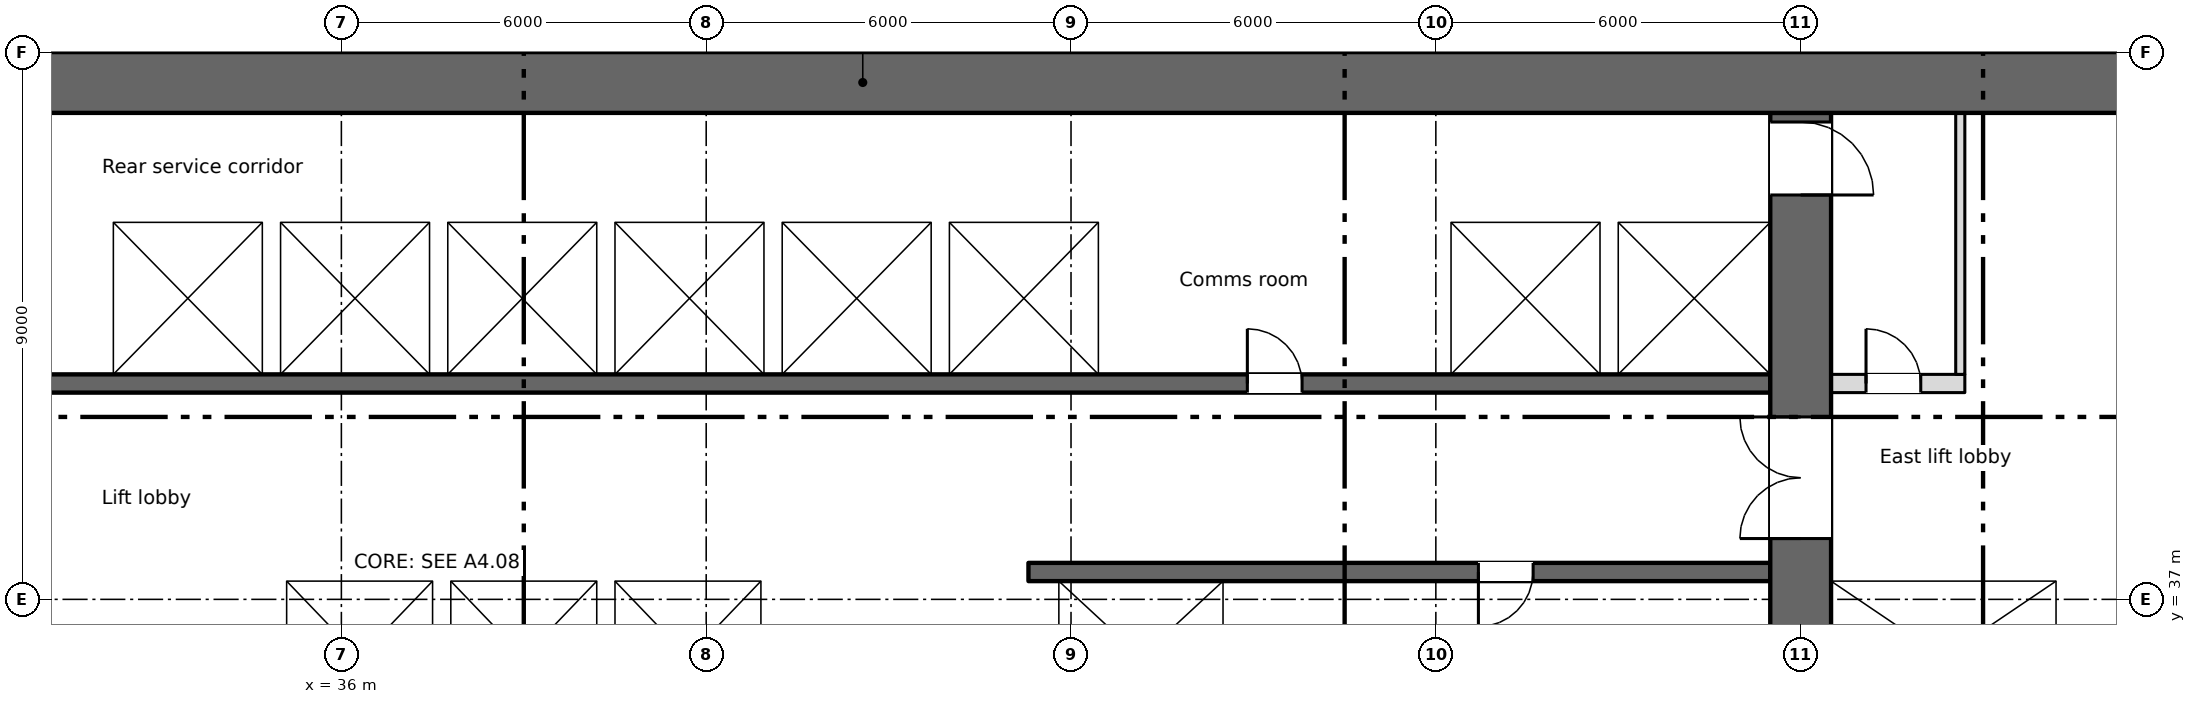
"""IFC4 building model, lengths in metres.
Left out: names, types, materials, properties, quantities, classifications, styles, units other than length and angle.
Written with IfcOpenShell. Run it as: python <this file> out.ifc"""

import sys

from ifc_helpers import new_model, si_unit, direction, frame, frame_2d, origin, place, context, subcontext, project, spatial, rectangle, extrude, element, fill, save


model = new_model("IFC4")
c1 = context("Model", 3, precision=1e-05, world=origin(), true_north=direction((0.0, 1.0)))
c2 = subcontext(c1, "Body", "Model", "MODEL_VIEW")
j1 = project(units=[si_unit("LENGTHUNIT", "METRE"), si_unit("PLANEANGLEUNIT", "RADIAN")], contexts=[c1])
p1 = place(None, origin())
s1 = spatial("IfcSite", under=j1, at=p1, CompositionType="ELEMENT")
p2 = place(p1, origin())
s2 = spatial("IfcBuilding", under=s1, at=p2, CompositionType="ELEMENT")
p3 = place(p2, frame((0.0, 0.0, 30.0)))
s3 = spatial("IfcBuildingStorey", under=s2, at=p3, CompositionType="ELEMENT", Elevation=30.0)
p4 = place(p3, frame((5.55, 45.5, 0.0), z_axis=(0.0, 0.0, 1.0), x_axis=(1.0, 0.0, 0.0)))
e1 = element("IfcWall", 1, at=p4, inside=s3, PredefinedType="SHEAR", context=c2, shape_type="SweptSolid", body=[
    extrude(rectangle(XDim=66.9, YDim=1.0, at=frame_2d((33.45, 0.0))), origin(), (0.0, 0.0, 1.0), 3.35),
])
p5 = place(p4, frame((7.2, 0.0, 0.6)))
e2 = element("IfcOpeningElement", 2, at=p5, cuts=e1, PredefinedType="OPENING", context=c2, shape_type="SweptSolid", body=[
    extrude(rectangle(XDim=0.6, YDim=2.4, at=frame_2d((0.3, 1.2))), frame((0.0, 0.51, 0.0), z_axis=(0.0, -1.0, 0.0), x_axis=(1.0, 0.0, 0.0)), (0.0, 0.0, 1.0), 1.02),
])
p6 = place(p4, frame((61.2, 0.0, 0.6)))
e3 = element("IfcOpeningElement", 3, at=p6, cuts=e1, PredefinedType="OPENING", context=c2, shape_type="SweptSolid", body=[
    extrude(rectangle(XDim=0.6, YDim=2.4, at=frame_2d((0.3, 1.2))), frame((0.0, 0.51, 0.0), z_axis=(0.0, -1.0, 0.0), x_axis=(1.0, 0.0, 0.0)), (0.0, 0.0, 1.0), 1.02),
])
p7 = place(p3, frame((64.35, 34.8, 0.0), z_axis=(0.0, 0.0, 1.0), x_axis=(0.0, 1.0, 0.0)))
e4 = element("IfcWall", 4, at=p7, inside=s3, PredefinedType="SHEAR", context=c2, shape_type="SweptSolid", body=[
    extrude(rectangle(XDim=10.2, YDim=0.3, at=frame_2d((5.1, 0.0))), origin(), (0.0, 0.0, 1.0), 3.35),
])
p8 = place(p3, frame((60.0, 28.4, 0.0), z_axis=(0.0, 0.0, 1.0), x_axis=(0.0, 1.0, 0.0)))
e5 = element("IfcWall", 5, at=p8, inside=s3, PredefinedType="SHEAR", context=c2, shape_type="SweptSolid", body=[
    extrude(rectangle(XDim=16.6, YDim=1.0, at=frame_2d((8.3, 0.0))), origin(), (0.0, 0.0, 1.0), 3.35),
])
p9 = place(p8, frame((9.6, 0.0, 0.0)))
e6 = element("IfcOpeningElement", 6, at=p9, cuts=e5, PredefinedType="OPENING", context=c2, shape_type="SweptSolid", body=[
    extrude(rectangle(XDim=2.0, YDim=2.1, at=frame_2d((1.0, 1.05))), frame((0.0, 0.51, 0.0), z_axis=(0.0, -1.0, 0.0), x_axis=(1.0, 0.0, 0.0)), (0.0, 0.0, 1.0), 1.02),
])
p10 = place(p8, frame((15.25, 0.0, 0.0)))
e7 = element("IfcOpeningElement", 7, at=p10, cuts=e5, PredefinedType="OPENING", context=c2, shape_type="SweptSolid", body=[
    extrude(rectangle(XDim=1.2, YDim=2.1, at=frame_2d((0.6, 1.05))), frame((0.0, 0.51, 0.0), z_axis=(0.0, -1.0, 0.0), x_axis=(1.0, 0.0, 0.0)), (0.0, 0.0, 1.0), 1.02),
])
p11 = place(p3, frame((34.8, 37.45, 0.0), z_axis=(0.0, 0.0, 1.0), x_axis=(1.0, 0.0, 0.0)))
e8 = element("IfcWall", 8, at=p11, inside=s3, PredefinedType="SHEAR", context=c2, shape_type="SweptSolid", body=[
    extrude(rectangle(XDim=8.4, YDim=0.3, at=frame_2d((4.2, 0.0))), origin(), (0.0, 0.0, 1.0), 3.35),
])
p12 = place(p11, frame((0.95, 0.0, 0.0)))
e9 = element("IfcOpeningElement", 9, at=p12, cuts=e8, PredefinedType="OPENING", context=c2, shape_type="SweptSolid", body=[
    extrude(rectangle(XDim=1.1, YDim=2.1, at=frame_2d((0.55, 1.05))), frame((0.0, 0.16, 0.0), z_axis=(0.0, -1.0, 0.0), x_axis=(1.0, 0.0, 0.0)), (0.0, 0.0, 1.0), 0.32),
])
p13 = place(p11, frame((3.65, 0.0, 0.0)))
e10 = element("IfcOpeningElement", 10, at=p13, cuts=e8, PredefinedType="OPENING", context=c2, shape_type="SweptSolid", body=[
    extrude(rectangle(XDim=1.1, YDim=2.1, at=frame_2d((0.55, 1.05))), frame((0.0, 0.16, 0.0), z_axis=(0.0, -1.0, 0.0), x_axis=(1.0, 0.0, 0.0)), (0.0, 0.0, 1.0), 0.32),
])
p14 = place(p11, frame((6.35, 0.0, 0.0)))
e11 = element("IfcOpeningElement", 11, at=p14, cuts=e8, PredefinedType="OPENING", context=c2, shape_type="SweptSolid", body=[
    extrude(rectangle(XDim=1.1, YDim=2.1, at=frame_2d((0.55, 1.05))), frame((0.0, 0.16, 0.0), z_axis=(0.0, -1.0, 0.0), x_axis=(1.0, 0.0, 0.0)), (0.0, 0.0, 1.0), 0.32),
])
p15 = place(p3, frame((59.5, 37.45, 0.0), z_axis=(0.0, 0.0, 1.0), x_axis=(-1.0, 0.0, 0.0)))
e12 = element("IfcWall", 12, at=p15, inside=s3, PredefinedType="SHEAR", context=c2, shape_type="SweptSolid", body=[
    extrude(rectangle(XDim=12.2, YDim=0.3, at=frame_2d((6.1, 0.0))), origin(), (0.0, 0.0, 1.0), 3.35),
])
p16 = place(p15, frame((3.9, 0.0, 0.0)))
e13 = element("IfcOpeningElement", 13, at=p16, cuts=e12, PredefinedType="OPENING", context=c2, shape_type="SweptSolid", body=[
    extrude(rectangle(XDim=0.9, YDim=2.1, at=frame_2d((0.45, 1.05))), frame((0.0, 0.16, 0.0), z_axis=(0.0, -1.0, 0.0), x_axis=(1.0, 0.0, 0.0)), (0.0, 0.0, 1.0), 0.32),
])
p17 = place(p3, frame((60.5, 37.45, 0.0), z_axis=(0.0, 0.0, 1.0), x_axis=(1.0, 0.0, 0.0)))
e14 = element("IfcWall", 14, at=p17, inside=s3, PredefinedType="SHEAR", context=c2, shape_type="SweptSolid", body=[
    extrude(rectangle(XDim=3.7, YDim=0.3, at=frame_2d((1.85, 0.0))), origin(), (0.0, 0.0, 1.0), 3.35),
])
p18 = place(p17, frame((1.3, 0.0, 0.0)))
e15 = element("IfcOpeningElement", 15, at=p18, cuts=e14, PredefinedType="OPENING", context=c2, shape_type="SweptSolid", body=[
    extrude(rectangle(XDim=1.1, YDim=2.1, at=frame_2d((0.55, 1.05))), frame((0.0, 0.16, 0.0), z_axis=(0.0, -1.0, 0.0), x_axis=(1.0, 0.0, 0.0)), (0.0, 0.0, 1.0), 0.32),
])
for number, where, z_axis, x_axis in (
    (16, (34.95, 34.8, 0.0), (0.0, 0.0, 1.0), (0.0, 1.0, 0.0)),
    (17, (43.05, 34.8, 0.0), (0.0, 0.0, 1.0), (0.0, 1.0, 0.0)),
):
    element("IfcWall", number, at=place(p3, frame(where, z_axis=z_axis, x_axis=x_axis)), inside=s3, PredefinedType="SHEAR", context=c2, shape_type="SweptSolid", body=[
        extrude(rectangle(XDim=2.5, YDim=0.3, at=frame_2d((1.25, 0.0))), origin(), (0.0, 0.0, 1.0), 3.35),
    ])
p19 = place(p3, frame((47.55, 34.8, 0.0), z_axis=(0.0, 0.0, 1.0), x_axis=(0.0, 1.0, 0.0)))
e18 = element("IfcWall", 18, at=p19, inside=s3, PredefinedType="SHEAR", context=c2, shape_type="SweptSolid", body=[
    extrude(rectangle(XDim=2.5, YDim=0.5, at=frame_2d((1.25, 0.0))), origin(), (0.0, 0.0, 1.0), 3.35),
])
p20 = place(p3, frame((50.65, 34.8, 0.0), z_axis=(0.0, 0.0, 1.0), x_axis=(0.0, 1.0, 0.0)))
e19 = element("IfcWall", 19, at=p20, inside=s3, PredefinedType="SHEAR", context=c2, shape_type="SweptSolid", body=[
    extrude(rectangle(XDim=2.5, YDim=0.3, at=frame_2d((1.25, 0.0))), origin(), (0.0, 0.0, 1.0), 3.35),
])
p21 = place(p3, frame((18.5, 40.55, 0.0), z_axis=(0.0, 0.0, 1.0), x_axis=(1.0, 0.0, 0.0)))
e20 = element("IfcWall", 20, at=p21, inside=s3, PredefinedType="SHEAR", context=c2, shape_type="SweptSolid", body=[
    extrude(rectangle(XDim=41.0, YDim=0.3, at=frame_2d((20.5, 0.0))), origin(), (0.0, 0.0, 1.0), 3.35),
])
p22 = place(p21, frame((9.025, 0.0, 0.0)))
e21 = element("IfcOpeningElement", 21, at=p22, cuts=e20, PredefinedType="OPENING", context=c2, shape_type="SweptSolid", body=[
    extrude(rectangle(XDim=0.9, YDim=2.1, at=frame_2d((0.45, 1.05))), frame((0.0, 0.16, 0.0), z_axis=(0.0, -1.0, 0.0), x_axis=(1.0, 0.0, 0.0)), (0.0, 0.0, 1.0), 0.32),
])
p23 = place(p21, frame((32.4, 0.0, 0.0)))
e22 = element("IfcOpeningElement", 22, at=p23, cuts=e20, PredefinedType="OPENING", context=c2, shape_type="SweptSolid", body=[
    extrude(rectangle(XDim=0.9, YDim=2.1, at=frame_2d((0.45, 1.05))), frame((0.0, 0.16, 0.0), z_axis=(0.0, -1.0, 0.0), x_axis=(1.0, 0.0, 0.0)), (0.0, 0.0, 1.0), 0.32),
])
p24 = place(p21, frame((14.425, 0.0, 0.0)))
e23 = element("IfcOpeningElement", 23, at=p24, cuts=e20, PredefinedType="OPENING", context=c2, shape_type="SweptSolid", body=[
    extrude(rectangle(XDim=1.1, YDim=2.1, at=frame_2d((0.55, 1.05))), frame((0.0, 0.16, 0.0), z_axis=(0.0, -1.0, 0.0), x_axis=(1.0, 0.0, 0.0)), (0.0, 0.0, 1.0), 0.32),
])
p25 = place(p21, frame((17.175, 0.0, 0.0)))
e24 = element("IfcOpeningElement", 24, at=p25, cuts=e20, PredefinedType="OPENING", context=c2, shape_type="SweptSolid", body=[
    extrude(rectangle(XDim=1.1, YDim=2.1, at=frame_2d((0.55, 1.05))), frame((0.0, 0.16, 0.0), z_axis=(0.0, -1.0, 0.0), x_axis=(1.0, 0.0, 0.0)), (0.0, 0.0, 1.0), 0.32),
])
p26 = place(p21, frame((19.925, 0.0, 0.0)))
e25 = element("IfcOpeningElement", 25, at=p26, cuts=e20, PredefinedType="OPENING", context=c2, shape_type="SweptSolid", body=[
    extrude(rectangle(XDim=1.1, YDim=2.1, at=frame_2d((0.55, 1.05))), frame((0.0, 0.16, 0.0), z_axis=(0.0, -1.0, 0.0), x_axis=(1.0, 0.0, 0.0)), (0.0, 0.0, 1.0), 0.32),
])
p27 = place(p21, frame((22.675, 0.0, 0.0)))
e26 = element("IfcOpeningElement", 26, at=p27, cuts=e20, PredefinedType="OPENING", context=c2, shape_type="SweptSolid", body=[
    extrude(rectangle(XDim=1.1, YDim=2.1, at=frame_2d((0.55, 1.05))), frame((0.0, 0.16, 0.0), z_axis=(0.0, -1.0, 0.0), x_axis=(1.0, 0.0, 0.0)), (0.0, 0.0, 1.0), 0.32),
])
p28 = place(p21, frame((36.375, 0.0, 0.0)))
e27 = element("IfcOpeningElement", 27, at=p28, cuts=e20, PredefinedType="OPENING", context=c2, shape_type="SweptSolid", body=[
    extrude(rectangle(XDim=1.2, YDim=2.1, at=frame_2d((0.6, 1.05))), frame((0.0, 0.16, 0.0), z_axis=(0.0, -1.0, 0.0), x_axis=(1.0, 0.0, 0.0)), (0.0, 0.0, 1.0), 0.32),
])
p29 = place(p21, frame((39.15, 0.0, 0.0)))
e28 = element("IfcOpeningElement", 28, at=p29, cuts=e20, PredefinedType="OPENING", context=c2, shape_type="SweptSolid", body=[
    extrude(rectangle(XDim=1.2, YDim=2.1, at=frame_2d((0.6, 1.05))), frame((0.0, 0.16, 0.0), z_axis=(0.0, -1.0, 0.0), x_axis=(1.0, 0.0, 0.0)), (0.0, 0.0, 1.0), 0.32),
])
p30 = place(p3, frame((18.5, 43.35, 0.0), z_axis=(0.0, 0.0, 1.0), x_axis=(1.0, 0.0, 0.0)))
e29 = element("IfcWall", 29, at=p30, inside=s3, PredefinedType="SHEAR", context=c2, shape_type="SweptSolid", body=[
    extrude(rectangle(XDim=41.0, YDim=0.3, at=frame_2d((20.5, 0.0))), origin(), (0.0, 0.0, 1.0), 3.35),
])
p31 = place(p3, frame((60.5, 40.55, 0.0), z_axis=(0.0, 0.0, 1.0), x_axis=(1.0, 0.0, 0.0)))
e30 = element("IfcWall", 30, at=p31, inside=s3, PredefinedType="PARTITIONING", context=c2, shape_type="SweptSolid", body=[
    extrude(rectangle(XDim=2.2, YDim=0.3, at=frame_2d((1.1, 0.0))), origin(), (0.0, 0.0, 1.0), 3.35),
])
p32 = place(p31, frame((0.575, 0.0, 0.0)))
e31 = element("IfcOpeningElement", 31, at=p32, cuts=e30, PredefinedType="OPENING", context=c2, shape_type="SweptSolid", body=[
    extrude(rectangle(XDim=0.9, YDim=2.1, at=frame_2d((0.45, 1.05))), frame((0.0, 0.16, 0.0), z_axis=(0.0, -1.0, 0.0), x_axis=(1.0, 0.0, 0.0)), (0.0, 0.0, 1.0), 0.32),
])
for number, where, z_axis, x_axis in (
    (32, (37.65, 34.8, 0.0), (0.0, 0.0, 1.0), (0.0, 1.0, 0.0)),
    (33, (40.35, 34.8, 0.0), (0.0, 0.0, 1.0), (0.0, 1.0, 0.0)),
    (34, (32.1, 40.7, 0.0), (0.0, 0.0, 1.0), (0.0, 1.0, 0.0)),
    (35, (34.85, 40.7, 0.0), (0.0, 0.0, 1.0), (0.0, 1.0, 0.0)),
    (36, (37.6, 40.7, 0.0), (0.0, 0.0, 1.0), (0.0, 1.0, 0.0)),
    (37, (40.35, 40.7, 0.0), (0.0, 0.0, 1.0), (0.0, 1.0, 0.0)),
    (38, (43.1, 40.7, 0.0), (0.0, 0.0, 1.0), (0.0, 1.0, 0.0)),
    (39, (45.85, 40.7, 0.0), (0.0, 0.0, 1.0), (0.0, 1.0, 0.0)),
    (40, (48.6, 40.7, 0.0), (0.0, 0.0, 1.0), (0.0, 1.0, 0.0)),
    (41, (54.1, 40.7, 0.0), (0.0, 0.0, 1.0), (0.0, 1.0, 0.0)),
    (42, (56.85, 40.7, 0.0), (0.0, 0.0, 1.0), (0.0, 1.0, 0.0)),
):
    element("IfcWall", number, at=place(p3, frame(where, z_axis=z_axis, x_axis=x_axis)), inside=s3, PredefinedType="SHEAR", context=c2, shape_type="SweptSolid", body=[
        extrude(rectangle(XDim=2.5, YDim=0.3, at=frame_2d((1.25, 0.0))), origin(), (0.0, 0.0, 1.0), 3.35),
    ])
p33 = place(p3, frame((62.625, 40.7, 0.0), z_axis=(0.0, 0.0, 1.0), x_axis=(0.0, 1.0, 0.0)))
e43 = element("IfcWall", 43, at=p33, inside=s3, PredefinedType="PARTITIONING", context=c2, shape_type="SweptSolid", body=[
    extrude(rectangle(XDim=4.3, YDim=0.15, at=frame_2d((2.15, 0.0))), origin(), (0.0, 0.0, 1.0), 3.35),
])
p34 = place(p32, origin())
e44 = element("IfcDoor", 44, at=p34, inside=s3, OperationType="SINGLE_SWING_LEFT", PredefinedType="DOOR", context=c2, shape_type="SweptSolid", body=[
    extrude(rectangle(XDim=0.9, YDim=2.1, at=frame_2d((0.45, 1.05))), frame((0.0, 0.025, 0.0), z_axis=(0.0, -1.0, 0.0), x_axis=(1.0, 0.0, 0.0)), (0.0, 0.0, 1.0), 0.05),
])
fill(e31, e44)
p35 = place(p16, origin())
e45 = element("IfcDoor", 45, at=p35, inside=s3, OperationType="SINGLE_SWING_RIGHT", PredefinedType="DOOR", context=c2, shape_type="SweptSolid", body=[
    extrude(rectangle(XDim=0.9, YDim=2.1, at=frame_2d((0.45, 1.05))), frame((0.0, 0.025, 0.0), z_axis=(0.0, -1.0, 0.0), x_axis=(1.0, 0.0, 0.0)), (0.0, 0.0, 1.0), 0.05),
])
fill(e13, e45)
p36 = place(p23, origin())
e46 = element("IfcDoor", 46, at=p36, inside=s3, OperationType="SINGLE_SWING_LEFT", PredefinedType="DOOR", context=c2, shape_type="SweptSolid", body=[
    extrude(rectangle(XDim=0.9, YDim=2.1, at=frame_2d((0.45, 1.05))), frame((0.0, 0.025, 0.0), z_axis=(0.0, -1.0, 0.0), x_axis=(1.0, 0.0, 0.0)), (0.0, 0.0, 1.0), 0.05),
])
fill(e22, e46)
p37 = place(p12, origin())
e47 = element("IfcDoor", 47, at=p37, inside=s3, OperationType="SLIDING_TO_LEFT", PredefinedType="DOOR", context=c2, shape_type="SweptSolid", body=[
    extrude(rectangle(XDim=1.1, YDim=2.1, at=frame_2d((0.55, 1.05))), frame((0.0, 0.025, 0.0), z_axis=(0.0, -1.0, 0.0), x_axis=(1.0, 0.0, 0.0)), (0.0, 0.0, 1.0), 0.05),
])
fill(e9, e47)
p38 = place(p13, origin())
e48 = element("IfcDoor", 48, at=p38, inside=s3, OperationType="SLIDING_TO_LEFT", PredefinedType="DOOR", context=c2, shape_type="SweptSolid", body=[
    extrude(rectangle(XDim=1.1, YDim=2.1, at=frame_2d((0.55, 1.05))), frame((0.0, 0.025, 0.0), z_axis=(0.0, -1.0, 0.0), x_axis=(1.0, 0.0, 0.0)), (0.0, 0.0, 1.0), 0.05),
])
fill(e10, e48)
p39 = place(p14, origin())
e49 = element("IfcDoor", 49, at=p39, inside=s3, OperationType="SLIDING_TO_LEFT", PredefinedType="DOOR", context=c2, shape_type="SweptSolid", body=[
    extrude(rectangle(XDim=1.1, YDim=2.1, at=frame_2d((0.55, 1.05))), frame((0.0, 0.025, 0.0), z_axis=(0.0, -1.0, 0.0), x_axis=(1.0, 0.0, 0.0)), (0.0, 0.0, 1.0), 0.05),
])
fill(e11, e49)
p40 = place(p24, origin())
e50 = element("IfcDoor", 50, at=p40, inside=s3, OperationType="SLIDING_TO_LEFT", PredefinedType="DOOR", context=c2, shape_type="SweptSolid", body=[
    extrude(rectangle(XDim=1.1, YDim=2.1, at=frame_2d((0.55, 1.05))), frame((0.0, 0.025, 0.0), z_axis=(0.0, -1.0, 0.0), x_axis=(1.0, 0.0, 0.0)), (0.0, 0.0, 1.0), 0.05),
])
fill(e23, e50)
p41 = place(p25, origin())
e51 = element("IfcDoor", 51, at=p41, inside=s3, OperationType="SLIDING_TO_LEFT", PredefinedType="DOOR", context=c2, shape_type="SweptSolid", body=[
    extrude(rectangle(XDim=1.1, YDim=2.1, at=frame_2d((0.55, 1.05))), frame((0.0, 0.025, 0.0), z_axis=(0.0, -1.0, 0.0), x_axis=(1.0, 0.0, 0.0)), (0.0, 0.0, 1.0), 0.05),
])
fill(e24, e51)
p42 = place(p26, origin())
e52 = element("IfcDoor", 52, at=p42, inside=s3, OperationType="SLIDING_TO_LEFT", PredefinedType="DOOR", context=c2, shape_type="SweptSolid", body=[
    extrude(rectangle(XDim=1.1, YDim=2.1, at=frame_2d((0.55, 1.05))), frame((0.0, 0.025, 0.0), z_axis=(0.0, -1.0, 0.0), x_axis=(1.0, 0.0, 0.0)), (0.0, 0.0, 1.0), 0.05),
])
fill(e25, e52)
p43 = place(p27, origin())
e53 = element("IfcDoor", 53, at=p43, inside=s3, OperationType="SLIDING_TO_LEFT", PredefinedType="DOOR", context=c2, shape_type="SweptSolid", body=[
    extrude(rectangle(XDim=1.1, YDim=2.1, at=frame_2d((0.55, 1.05))), frame((0.0, 0.025, 0.0), z_axis=(0.0, -1.0, 0.0), x_axis=(1.0, 0.0, 0.0)), (0.0, 0.0, 1.0), 0.05),
])
fill(e26, e53)
p44 = place(p28, origin())
e54 = element("IfcDoor", 54, at=p44, inside=s3, OperationType="SLIDING_TO_LEFT", PredefinedType="DOOR", context=c2, shape_type="SweptSolid", body=[
    extrude(rectangle(XDim=1.2, YDim=2.1, at=frame_2d((0.6, 1.05))), frame((0.0, 0.025, 0.0), z_axis=(0.0, -1.0, 0.0), x_axis=(1.0, 0.0, 0.0)), (0.0, 0.0, 1.0), 0.05),
])
fill(e27, e54)
p45 = place(p29, origin())
e55 = element("IfcDoor", 55, at=p45, inside=s3, OperationType="SLIDING_TO_LEFT", PredefinedType="DOOR", context=c2, shape_type="SweptSolid", body=[
    extrude(rectangle(XDim=1.2, YDim=2.1, at=frame_2d((0.6, 1.05))), frame((0.0, 0.025, 0.0), z_axis=(0.0, -1.0, 0.0), x_axis=(1.0, 0.0, 0.0)), (0.0, 0.0, 1.0), 0.05),
])
fill(e28, e55)
p46 = place(p18, origin())
e56 = element("IfcDoor", 56, at=p46, inside=s3, OperationType="SLIDING_TO_LEFT", PredefinedType="DOOR", context=c2, shape_type="SweptSolid", body=[
    extrude(rectangle(XDim=1.1, YDim=2.1, at=frame_2d((0.55, 1.05))), frame((0.0, 0.025, 0.0), z_axis=(0.0, -1.0, 0.0), x_axis=(1.0, 0.0, 0.0)), (0.0, 0.0, 1.0), 0.05),
])
fill(e15, e56)
p47 = place(p9, origin())
e57 = element("IfcDoor", 57, at=p47, inside=s3, OperationType="DOUBLE_DOOR_SINGLE_SWING", PredefinedType="DOOR", context=c2, shape_type="SweptSolid", body=[
    extrude(rectangle(XDim=2.0, YDim=2.1, at=frame_2d((1.0, 1.05))), frame((0.0, 0.025, 0.0), z_axis=(0.0, -1.0, 0.0), x_axis=(1.0, 0.0, 0.0)), (0.0, 0.0, 1.0), 0.05),
])
fill(e6, e57)
p48 = place(p10, origin())
e58 = element("IfcDoor", 58, at=p48, inside=s3, OperationType="SINGLE_SWING_LEFT", PredefinedType="DOOR", context=c2, shape_type="SweptSolid", body=[
    extrude(rectangle(XDim=1.2, YDim=2.1, at=frame_2d((0.6, 1.05))), frame((0.0, 0.025, 0.0), z_axis=(0.0, -1.0, 0.0), x_axis=(1.0, 0.0, 0.0)), (0.0, 0.0, 1.0), 0.05),
])
fill(e7, e58)
save(model, sys.argv[1])
